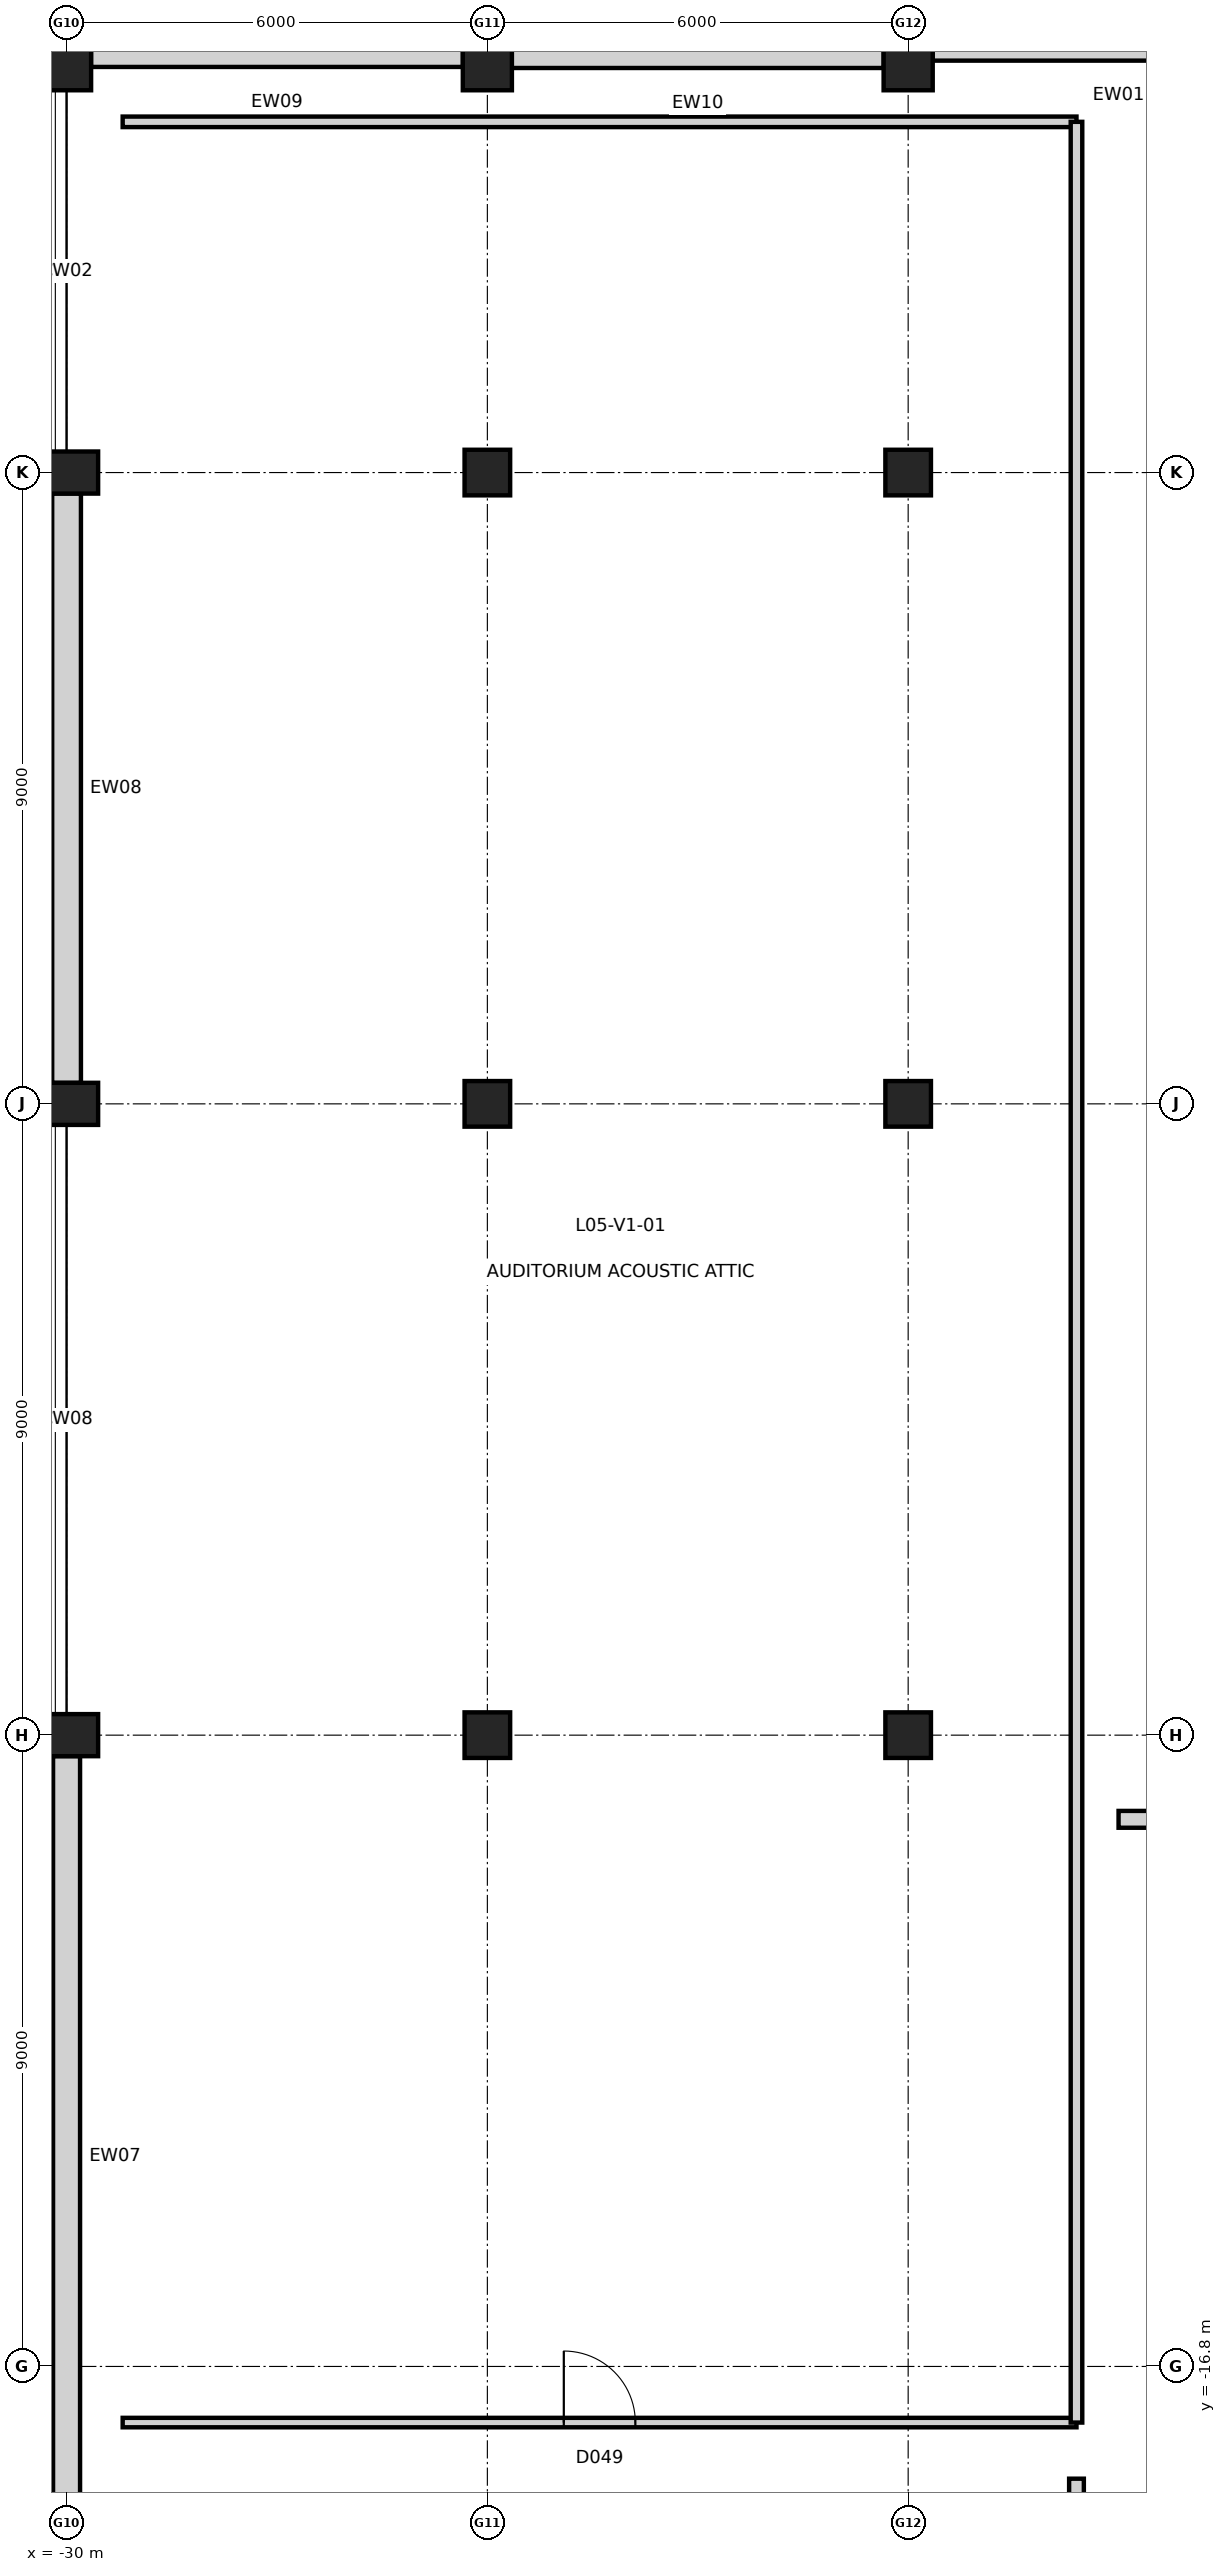
"""IFC4 building model, lengths in metres.
Left out: names, types, materials, properties, quantities, classifications, styles, units other than length and angle.
Written with IfcOpenShell. Run it as: python <this file> out.ifc"""

import sys

from ifc_helpers import new_model, si_unit, direction, frame, frame_2d, origin, origin_2d, place, context, subcontext, project, spatial, rectangle, extrude, element, fill, save


model = new_model("IFC4")
c1 = context("Model", 3, precision=1e-05, world=origin(), true_north=direction((0.0, 1.0)))
c2 = subcontext(c1, "Body", "Model", "MODEL_VIEW")
j1 = project(units=[si_unit("LENGTHUNIT", "METRE"), si_unit("PLANEANGLEUNIT", "RADIAN")], contexts=[c1])
p1 = place(None, origin())
s1 = spatial("IfcSite", under=j1, at=p1, CompositionType="ELEMENT")
p2 = place(p1, origin())
s2 = spatial("IfcBuilding", under=s1, at=p2, CompositionType="ELEMENT")
p3 = place(p2, frame((0.0, 0.0, 24.6)))
s3 = spatial("IfcBuildingStorey", under=s2, at=p3, CompositionType="ELEMENT", Elevation=24.6)
for number, where, z_axis, x_axis in (
    (1, (-30.0, -7.8, 0.0), (0.0, 0.0, 1.0), (0.0, 1.0, 0.0)),
    (2, (-30.0, 1.2, 0.0), (0.0, 0.0, 1.0), (0.0, 1.0, 0.0)),
    (3, (-30.0, 10.2, 0.0), (0.0, 0.0, 1.0), (0.0, 1.0, 0.0)),
):
    element("IfcColumn", number, at=place(p3, frame(where, z_axis=z_axis, x_axis=x_axis)), inside=s3, PredefinedType="COLUMN", context=c2, shape_type="SweptSolid", body=[
        extrude(rectangle(XDim=0.6, YDim=0.9, at=origin_2d()), origin(), (0.0, 0.0, 1.0), 5.4),
    ])
p4 = place(p3, frame((-30.0, 16.2, 0.0), z_axis=(0.0, 0.0, 1.0), x_axis=(1.0, 0.0, 0.0)))
e4 = element("IfcColumn", 4, at=p4, inside=s3, PredefinedType="COLUMN", context=c2, shape_type="SweptSolid", body=[
    extrude(rectangle(XDim=0.7, YDim=1.1, at=origin_2d()), origin(), (0.0, 0.0, 1.0), 5.4),
])
for number, where, z_axis, x_axis in (
    (5, (-24.0, -7.8, 0.0), (0.0, 0.0, 1.0), (1.0, 0.0, 0.0)),
    (6, (-24.0, 1.2, 0.0), (0.0, 0.0, 1.0), (1.0, 0.0, 0.0)),
    (7, (-24.0, 10.2, 0.0), (0.0, 0.0, 1.0), (1.0, 0.0, 0.0)),
):
    element("IfcColumn", number, at=place(p3, frame(where, z_axis=z_axis, x_axis=x_axis)), inside=s3, PredefinedType="COLUMN", context=c2, shape_type="SweptSolid", body=[
        extrude(rectangle(XDim=0.65, YDim=0.65, at=origin_2d()), origin(), (0.0, 0.0, 1.0), 5.4),
    ])
p5 = place(p3, frame((-24.0, 16.2, 0.0), z_axis=(0.0, 0.0, 1.0), x_axis=(1.0, 0.0, 0.0)))
e8 = element("IfcColumn", 8, at=p5, inside=s3, PredefinedType="COLUMN", context=c2, shape_type="SweptSolid", body=[
    extrude(rectangle(XDim=0.7, YDim=1.1, at=origin_2d()), origin(), (0.0, 0.0, 1.0), 5.4),
])
for number, where, z_axis, x_axis in (
    (9, (-18.0, -7.8, 0.0), (0.0, 0.0, 1.0), (1.0, 0.0, 0.0)),
    (10, (-18.0, 1.2, 0.0), (0.0, 0.0, 1.0), (1.0, 0.0, 0.0)),
    (11, (-18.0, 10.2, 0.0), (0.0, 0.0, 1.0), (1.0, 0.0, 0.0)),
):
    element("IfcColumn", number, at=place(p3, frame(where, z_axis=z_axis, x_axis=x_axis)), inside=s3, PredefinedType="COLUMN", context=c2, shape_type="SweptSolid", body=[
        extrude(rectangle(XDim=0.65, YDim=0.65, at=origin_2d()), origin(), (0.0, 0.0, 1.0), 5.4),
    ])
p6 = place(p3, frame((-18.0, 16.2, 0.0), z_axis=(0.0, 0.0, 1.0), x_axis=(1.0, 0.0, 0.0)))
e12 = element("IfcColumn", 12, at=p6, inside=s3, PredefinedType="COLUMN", context=c2, shape_type="SweptSolid", body=[
    extrude(rectangle(XDim=0.7, YDim=1.1, at=origin_2d()), origin(), (0.0, 0.0, 1.0), 5.4),
])
p7 = place(p3, frame((-30.0, -19.502, 0.0), z_axis=(0.0, 0.0, 1.0), x_axis=(0.0, 1.0, 0.0)))
e13 = element("IfcWall", 13, at=p7, inside=s3, PredefinedType="STANDARD", context=c2, shape_type="SweptSolid", body=[
    extrude(rectangle(XDim=11.404, YDim=0.385, at=frame_2d((5.702, 0.0))), origin(), (0.0, 0.0, 1.0), 5.05),
])
p8 = place(p3, frame((-30.0, 1.498, 0.0), z_axis=(0.0, 0.0, 1.0), x_axis=(0.0, 1.0, 0.0)))
e14 = element("IfcWall", 14, at=p8, inside=s3, PredefinedType="STANDARD", context=c2, shape_type="SweptSolid", body=[
    extrude(rectangle(XDim=8.404, YDim=0.41, at=frame_2d((4.202, 0.0))), origin(), (0.0, 0.0, 1.0), 5.05),
])
p9 = place(p3, frame((-29.652, 16.2, 0.0), z_axis=(0.0, 0.0, 1.0), x_axis=(1.0, 0.0, 0.0)))
e15 = element("IfcWall", 15, at=p9, inside=s3, PredefinedType="STANDARD", context=c2, shape_type="SweptSolid", body=[
    extrude(rectangle(XDim=5.304, YDim=0.435, at=frame_2d((2.652, 0.0))), origin(), (0.0, 0.0, 1.0), 4.197),
])
p10 = place(p3, frame((-23.652, 16.2, 0.0), z_axis=(0.0, 0.0, 1.0), x_axis=(1.0, 0.0, 0.0)))
e16 = element("IfcWall", 16, at=p10, inside=s3, PredefinedType="STANDARD", context=c2, shape_type="SweptSolid", body=[
    extrude(rectangle(XDim=5.304, YDim=0.465, at=frame_2d((2.652, 0.0))), origin(), (0.0, 0.0, 1.0), 4.197),
])
p11 = place(p3, frame((-17.652, 16.2, 0.0), z_axis=(0.0, 0.0, 1.0), x_axis=(1.0, 0.0, 0.0)))
e17 = element("IfcWall", 17, at=p11, inside=s3, PredefinedType="STANDARD", context=c2, shape_type="SweptSolid", body=[
    extrude(rectangle(XDim=5.304, YDim=0.255, at=frame_2d((2.652, 0.0))), origin(), (0.0, 0.0, 1.0), 4.197),
])
p12 = place(p3, frame((-29.2, -17.6, 0.0), z_axis=(0.0, 0.0, 1.0), x_axis=(1.0, 0.0, 0.0)))
e18 = element("IfcWall", 18, at=p12, inside=s3, PredefinedType="PARTITIONING", context=c2, shape_type="SweptSolid", body=[
    extrude(rectangle(XDim=13.6, YDim=0.135, at=frame_2d((6.8, 0.0))), origin(), (0.0, 0.0, 1.0), 5.02),
])
p13 = place(p12, frame((6.29, 0.0, 0.0)))
e19 = element("IfcOpeningElement", 19, at=p13, cuts=e18, PredefinedType="OPENING", context=c2, shape_type="SweptSolid", body=[
    extrude(rectangle(XDim=1.02, YDim=2.15, at=frame_2d((0.51, 1.075))), frame((0.0, 0.077, 0.0), z_axis=(0.0, -1.0, 0.0), x_axis=(1.0, 0.0, 0.0)), (0.0, 0.0, 1.0), 0.155),
])
p14 = place(p3, frame((-29.2, 15.2, 0.0), z_axis=(0.0, 0.0, 1.0), x_axis=(1.0, 0.0, 0.0)))
e20 = element("IfcWall", 20, at=p14, inside=s3, PredefinedType="PARTITIONING", context=c2, shape_type="SweptSolid", body=[
    extrude(rectangle(XDim=13.6, YDim=0.15, at=frame_2d((6.8, 0.0))), origin(), (0.0, 0.0, 1.0), 5.02),
])
p15 = place(p3, frame((-15.6, -17.6, 0.0), z_axis=(0.0, 0.0, 1.0), x_axis=(0.0, 1.0, 0.0)))
e21 = element("IfcWall", 21, at=p15, inside=s3, PredefinedType="PARTITIONING", context=c2, shape_type="SweptSolid", body=[
    extrude(rectangle(XDim=32.8, YDim=0.165, at=frame_2d((16.4, 0.0))), origin(), (0.0, 0.0, 1.0), 5.02),
])
p16 = place(p3, frame((-15.6, -27.6, 0.0), z_axis=(0.0, 0.0, 1.0), x_axis=(0.0, 1.0, 0.0)))
e22 = element("IfcWall", 22, at=p16, inside=s3, PredefinedType="PARTITIONING", context=c2, shape_type="SweptSolid", body=[
    extrude(rectangle(XDim=9.2, YDim=0.21, at=frame_2d((4.6, 0.0))), origin(), (0.0, 0.0, 1.0), 5.02),
])
p17 = place(p3, frame((-15.0, -9.0, 0.0), z_axis=(0.0, 0.0, 1.0), x_axis=(1.0, 0.0, 0.0)))
e23 = element("IfcWall", 23, at=p17, inside=s3, PredefinedType="PARTITIONING", context=c2, shape_type="SweptSolid", body=[
    extrude(rectangle(XDim=30.0, YDim=0.24, at=frame_2d((15.0, 0.0))), origin(), (0.0, 0.0, 1.0), 5.02),
])
p18 = place(p17, frame((14.46, 0.0, 0.0)))
e24 = element("IfcOpeningElement", 24, at=p18, cuts=e23, PredefinedType="OPENING", context=c2, shape_type="SweptSolid", body=[
    extrude(rectangle(XDim=1.08, YDim=2.25, at=frame_2d((0.54, 1.125))), frame((0.0, 0.13, 0.0), z_axis=(0.0, -1.0, 0.0), x_axis=(1.0, 0.0, 0.0)), (0.0, 0.0, 1.0), 0.26),
])
p19 = place(p13, origin())
e25 = element("IfcDoor", 25, at=p19, inside=s3, OperationType="SINGLE_SWING_LEFT", PredefinedType="DOOR", context=c2, shape_type="SweptSolid", body=[
    extrude(rectangle(XDim=1.02, YDim=2.15, at=frame_2d((0.51, 1.075))), frame((0.0, 0.025, 0.0), z_axis=(0.0, -1.0, 0.0), x_axis=(1.0, 0.0, 0.0)), (0.0, 0.0, 1.0), 0.05),
])
fill(e19, e25)
save(model, sys.argv[1])
